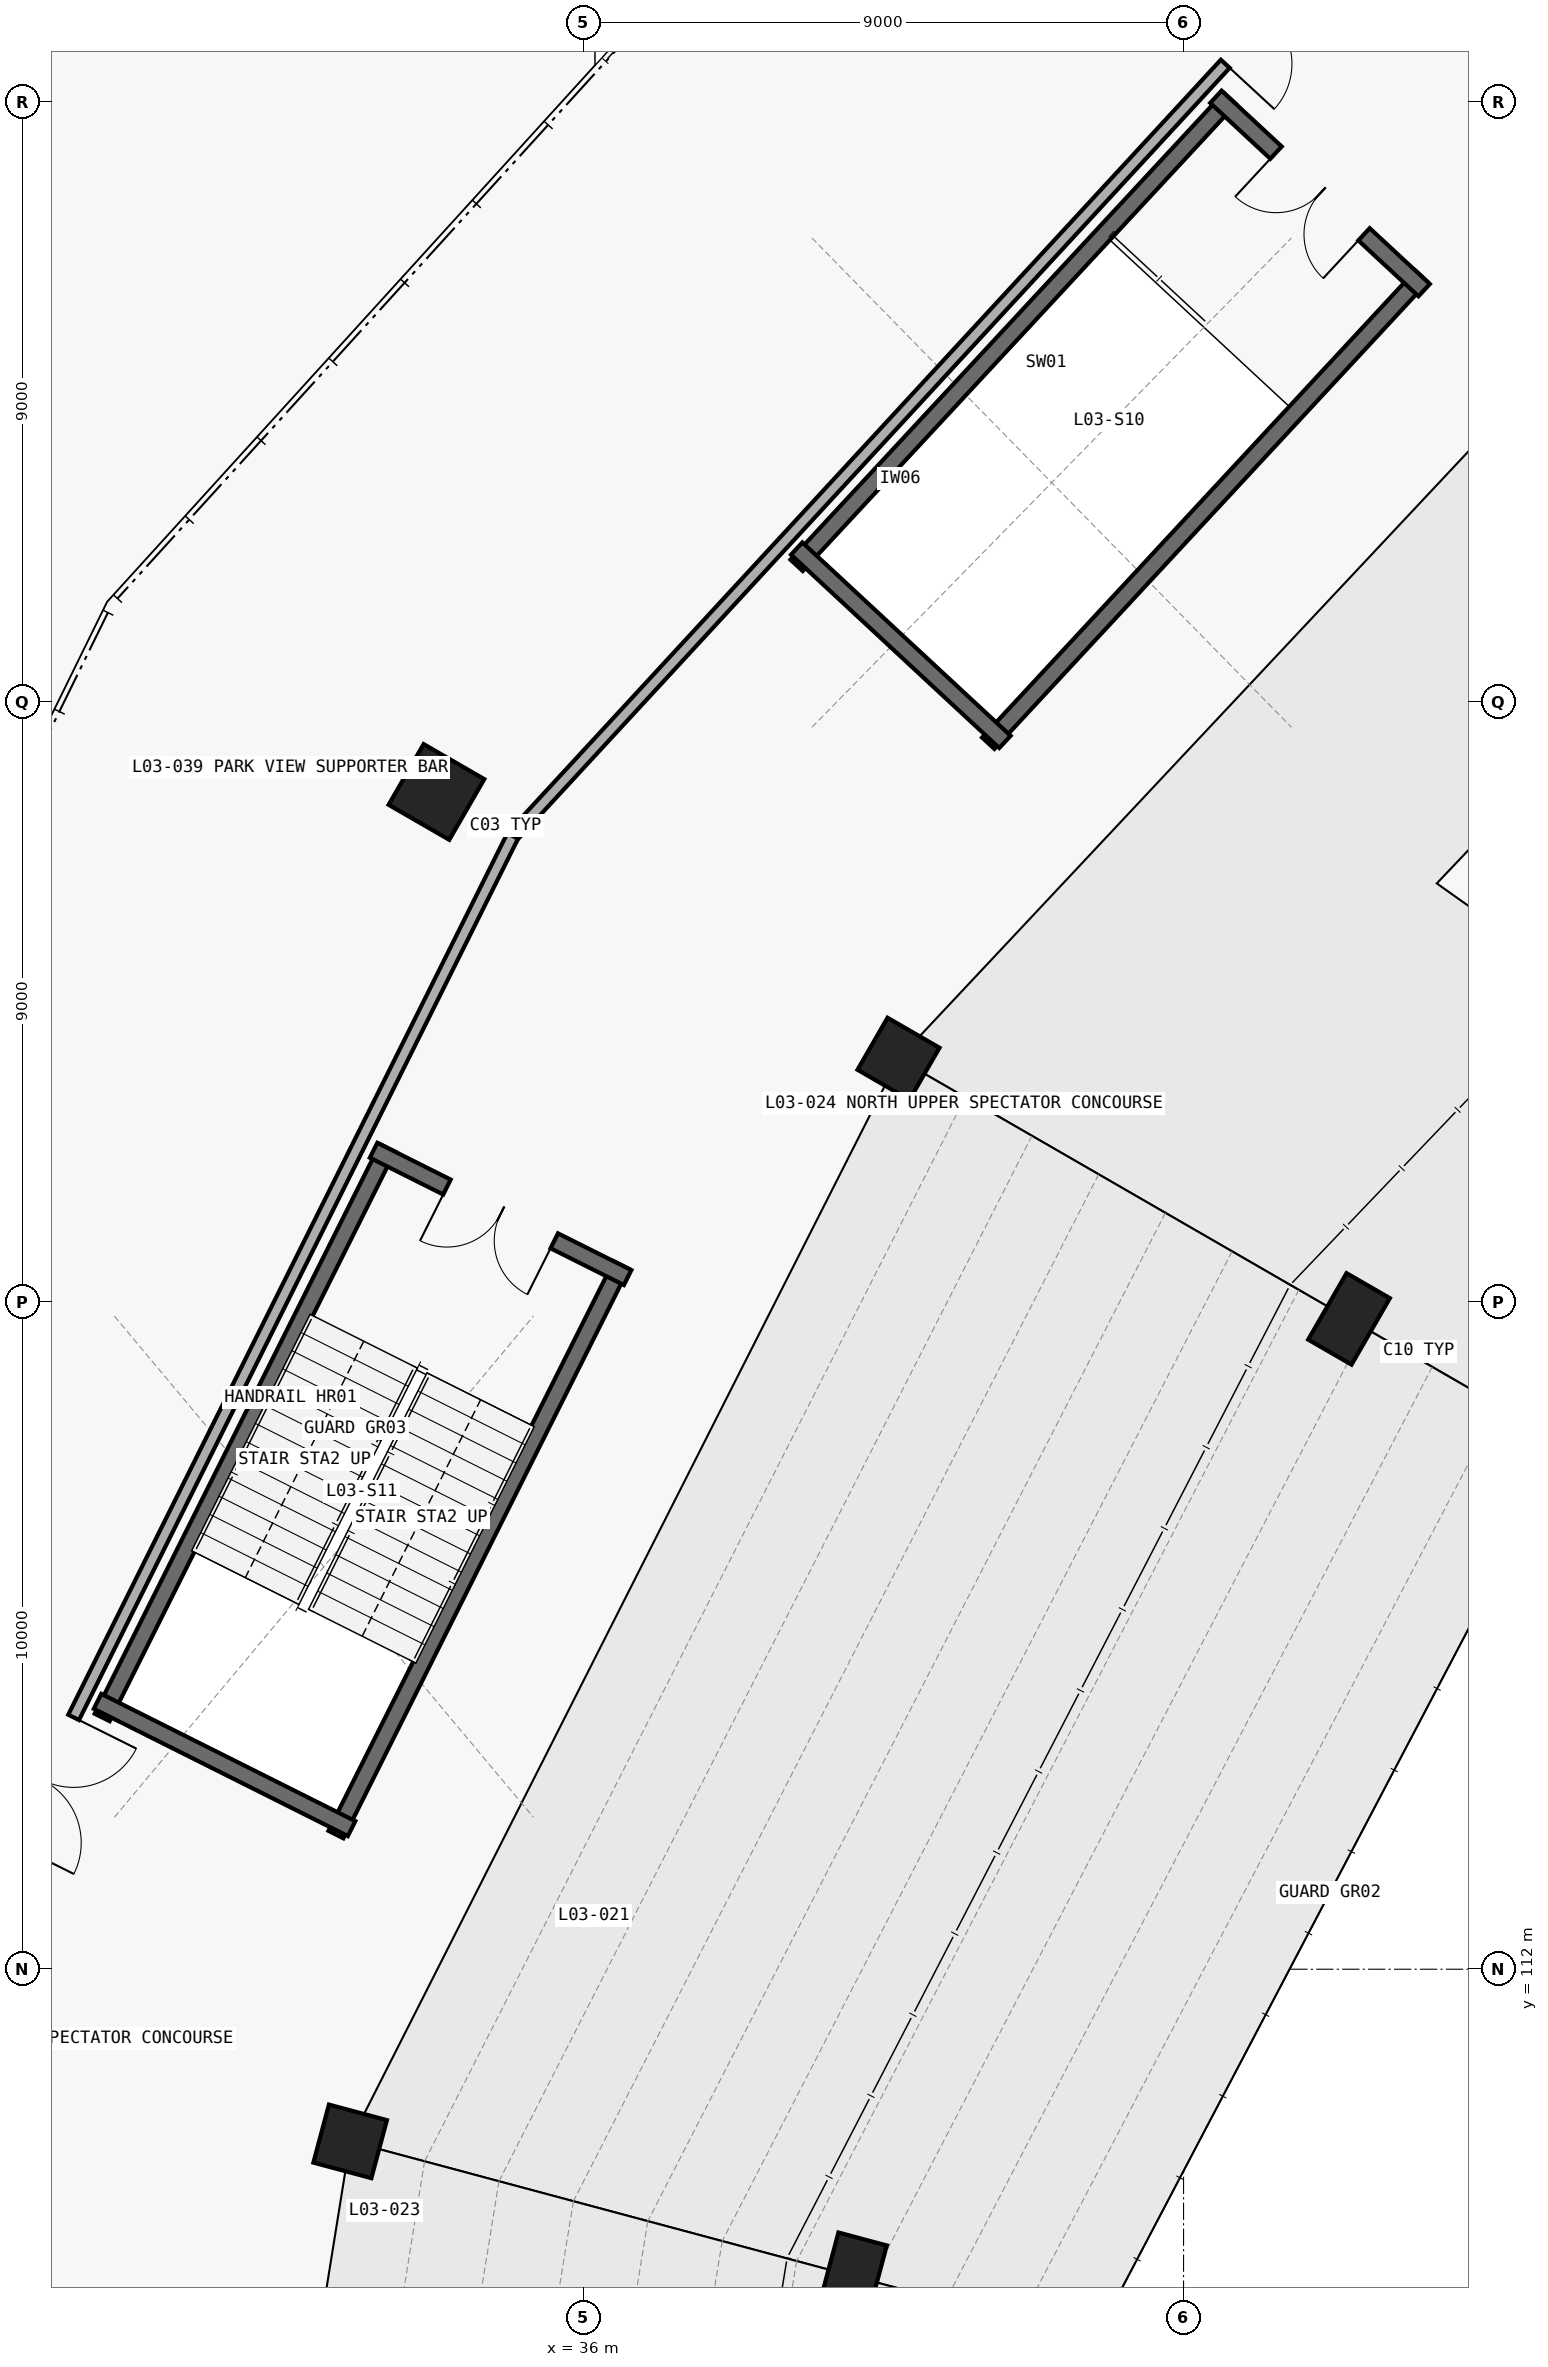
"""IFC4 building model, lengths in metres.
Left out: names, types, materials, properties, quantities, classifications, styles, units other than length and angle.
Written with IfcOpenShell. Run it as: python <this file> out.ifc"""

import sys

from ifc_helpers import new_model, si_unit, direction, frame, frame_2d, origin, origin_2d, place, context, subcontext, project, spatial, rectangle, extrude, element, fill, save


model = new_model("IFC4")
c1 = context("Model", 3, precision=1e-05, world=origin(), true_north=direction((0.0, 1.0)))
c2 = subcontext(c1, "Body", "Model", "MODEL_VIEW")
j1 = project(units=[si_unit("LENGTHUNIT", "METRE"), si_unit("PLANEANGLEUNIT", "RADIAN")], contexts=[c1])
p1 = place(None, origin())
s1 = spatial("IfcSite", under=j1, at=p1, CompositionType="ELEMENT")
p2 = place(p1, origin())
s2 = spatial("IfcBuilding", under=s1, at=p2, CompositionType="ELEMENT")
p3 = place(p2, frame((0.0, 0.0, 15.0)))
s3 = spatial("IfcBuildingStorey", under=s2, at=p3, CompositionType="ELEMENT", Elevation=15.0)
p4 = place(p3, frame((47.481, 121.75, 0.0), z_axis=(0.0, 0.0, 1.0), x_axis=(-0.866025403784, 0.5, 0.0)))
e1 = element("IfcColumn", 1, at=p4, inside=s3, PredefinedType="COLUMN", context=c2, shape_type="SweptSolid", body=[
    extrude(rectangle(XDim=0.75, YDim=1.15, at=origin_2d()), origin(), (0.0, 0.0, 1.0), 4.8),
])
p5 = place(p3, frame((33.798, 129.65, 0.0), z_axis=(0.0, 0.0, 1.0), x_axis=(-0.866025403784, 0.5, 0.0)))
e2 = element("IfcColumn", 2, at=p5, inside=s3, PredefinedType="COLUMN", context=c2, shape_type="SweptSolid", body=[
    extrude(rectangle(XDim=1.05, YDim=1.05, at=origin_2d()), origin(), (0.0, 0.0, 1.0), 4.8),
])
p6 = place(p3, frame((40.726, 125.65, 0.0), z_axis=(0.0, 0.0, 1.0), x_axis=(-0.866025403784, 0.5, 0.0)))
e3 = element("IfcColumn", 3, at=p6, inside=s3, PredefinedType="COLUMN", context=c2, shape_type="SweptSolid", body=[
    extrude(rectangle(XDim=0.9, YDim=0.9, at=origin_2d()), origin(), (0.0, 0.0, 1.0), 4.8),
])
p7 = place(p3, frame((40.039, 107.4, 0.0), z_axis=(0.0, 0.0, 1.0), x_axis=(-0.965925826289, 0.258819045103, 0.0)))
e4 = element("IfcColumn", 4, at=p7, inside=s3, PredefinedType="COLUMN", context=c2, shape_type="SweptSolid", body=[
    extrude(rectangle(XDim=0.75, YDim=1.15, at=origin_2d()), origin(), (0.0, 0.0, 1.0), 4.8),
])
p8 = place(p3, frame((32.504, 109.419, 0.0), z_axis=(0.0, 0.0, 1.0), x_axis=(-0.965925826289, 0.258819045103, 0.0)))
e5 = element("IfcColumn", 5, at=p8, inside=s3, PredefinedType="COLUMN", context=c2, shape_type="SweptSolid", body=[
    extrude(rectangle(XDim=0.9, YDim=0.9, at=origin_2d()), origin(), (0.0, 0.0, 1.0), 4.8),
])
p9 = place(p3, frame((45.694, 140.048, 0.0), z_axis=(0.0, 0.0, 1.0), x_axis=(-0.680257902718, -0.7329728411, 0.0)))
e6 = element("IfcWall", 6, at=p9, inside=s3, PredefinedType="SHEAR", context=c2, shape_type="SweptSolid", body=[
    extrude(rectangle(XDim=9.55, YDim=0.25, at=frame_2d((4.775, 0.0))), origin(), (0.0, 0.0, 1.0), 4.54),
])
p10 = place(p3, frame((42.071, 130.381, 0.0), z_axis=(0.0, 0.0, 1.0), x_axis=(0.680245155897, 0.732984670971, 0.0)))
e7 = element("IfcWall", 7, at=p10, inside=s3, PredefinedType="SHEAR", context=c2, shape_type="SweptSolid", body=[
    extrude(rectangle(XDim=9.55, YDim=0.25, at=frame_2d((4.775, 0.0))), origin(), (0.0, 0.0, 1.0), 4.54),
])
p11 = place(p3, frame((48.607, 137.174, 0.0), z_axis=(0.0, 0.0, 1.0), x_axis=(-0.73295064559, 0.680281817433, 0.0)))
e8 = element("IfcWall", 8, at=p11, inside=s3, PredefinedType="SHEAR", context=c2, shape_type="SweptSolid", body=[
    extrude(rectangle(XDim=4.26, YDim=0.25, at=frame_2d((2.13, 0.0))), origin(), (0.0, 0.0, 1.0), 4.54),
])
p12 = place(p11, frame((1.23, 0.0, 0.0)))
e9 = element("IfcOpeningElement", 9, at=p12, cuts=e8, PredefinedType="OPENING", context=c2, shape_type="SweptSolid", body=[
    extrude(rectangle(XDim=1.8, YDim=2.25, at=frame_2d((0.9, 1.125))), frame((0.0, 0.135, 0.0), z_axis=(0.0, -1.0, 0.0), x_axis=(1.0, 0.0, 0.0)), (0.0, 0.0, 1.0), 0.27),
])
p13 = place(p3, frame((39.199, 133.299, 0.0), z_axis=(0.0, 0.0, 1.0), x_axis=(0.732977166505, -0.680253242096, 0.0)))
e10 = element("IfcWall", 10, at=p13, inside=s3, PredefinedType="SHEAR", context=c2, shape_type="SweptSolid", body=[
    extrude(rectangle(XDim=4.26, YDim=0.25, at=frame_2d((2.13, 0.0))), origin(), (0.0, 0.0, 1.0), 4.54),
])
p14 = place(p3, frame((33.063, 124.313, 0.0), z_axis=(0.0, 0.0, 1.0), x_axis=(-0.447919041961, -0.894074119885, 0.0)))
e11 = element("IfcWall", 11, at=p14, inside=s3, PredefinedType="SHEAR", context=c2, shape_type="SweptSolid", body=[
    extrude(rectangle(XDim=9.55, YDim=0.25, at=frame_2d((4.775, 0.0))), origin(), (0.0, 0.0, 1.0), 4.54),
])
p15 = place(p3, frame((32.291, 114.019, 0.0), z_axis=(0.0, 0.0, 1.0), x_axis=(0.4479088042, 0.894079248792, 0.0)))
e12 = element("IfcWall", 12, at=p15, inside=s3, PredefinedType="SHEAR", context=c2, shape_type="SweptSolid", body=[
    extrude(rectangle(XDim=9.55, YDim=0.25, at=frame_2d((4.775, 0.0))), origin(), (0.0, 0.0, 1.0), 4.54),
])
p16 = place(p3, frame((36.664, 122.37, 0.0), z_axis=(0.0, 0.0, 1.0), x_axis=(-0.894071595331, 0.447924081092, 0.0)))
e13 = element("IfcWall", 13, at=p16, inside=s3, PredefinedType="SHEAR", context=c2, shape_type="SweptSolid", body=[
    extrude(rectangle(XDim=4.26, YDim=0.25, at=frame_2d((2.13, 0.0))), origin(), (0.0, 0.0, 1.0), 4.54),
])
p17 = place(p16, frame((1.23, 0.0, 0.0)))
e14 = element("IfcOpeningElement", 14, at=p17, cuts=e13, PredefinedType="OPENING", context=c2, shape_type="SweptSolid", body=[
    extrude(rectangle(XDim=1.8, YDim=2.25, at=frame_2d((0.9, 1.125))), frame((0.0, 0.135, 0.0), z_axis=(0.0, -1.0, 0.0), x_axis=(1.0, 0.0, 0.0)), (0.0, 0.0, 1.0), 0.27),
])
p18 = place(p3, frame((28.717, 116.016, 0.0), z_axis=(0.0, 0.0, 1.0), x_axis=(0.894083048484, -0.447901219481, 0.0)))
e15 = element("IfcWall", 15, at=p18, inside=s3, PredefinedType="SHEAR", context=c2, shape_type="SweptSolid", body=[
    extrude(rectangle(XDim=4.26, YDim=0.25, at=frame_2d((2.13, 0.0))), origin(), (0.0, 0.0, 1.0), 4.54),
])
p19 = place(p3, frame((49.082, 144.312, 0.0), z_axis=(0.0, 0.0, 1.0), x_axis=(-0.678220768878, -0.734858209903, 0.0)))
e16 = element("IfcWall", 16, at=p19, inside=s3, PredefinedType="PARTITIONING", context=c2, shape_type="SweptSolid", body=[
    extrude(rectangle(XDim=20.85, YDim=0.18, at=frame_2d((10.425, 0.0))), origin(), (0.0, 0.0, 1.0), 3.665),
])
p20 = place(p19, frame((3.097, 0.0, 0.0)))
e17 = element("IfcOpeningElement", 17, at=p20, cuts=e16, PredefinedType="OPENING", context=c2, shape_type="SweptSolid", body=[
    extrude(rectangle(XDim=2.0, YDim=2.3, at=frame_2d((1.0, 1.15))), frame((0.0, 0.1, 0.0), z_axis=(0.0, -1.0, 0.0), x_axis=(1.0, 0.0, 0.0)), (0.0, 0.0, 1.0), 0.2),
])
p21 = place(p3, frame((34.941, 128.99, 0.0), z_axis=(0.0, 0.0, 1.0), x_axis=(-0.44590512567, -0.895080230427, 0.0)))
e18 = element("IfcWall", 18, at=p21, inside=s3, PredefinedType="PARTITIONING", context=c2, shape_type="SweptSolid", body=[
    extrude(rectangle(XDim=19.935, YDim=0.18, at=frame_2d((9.967, 0.0))), origin(), (0.0, 0.0, 1.0), 3.665),
])
p22 = place(p21, frame((14.763, 0.0, 0.0)))
e19 = element("IfcOpeningElement", 19, at=p22, cuts=e18, PredefinedType="OPENING", context=c2, shape_type="SweptSolid", body=[
    extrude(rectangle(XDim=2.1, YDim=2.35, at=frame_2d((1.05, 1.175))), frame((0.0, 0.1, 0.0), z_axis=(0.0, -1.0, 0.0), x_axis=(1.0, 0.0, 0.0)), (0.0, 0.0, 1.0), 0.2),
])
p23 = place(p12, origin())
e20 = element("IfcDoor", 20, at=p23, inside=s3, OperationType="DOUBLE_DOOR_SINGLE_SWING", PredefinedType="DOOR", context=c2, shape_type="SweptSolid", body=[
    extrude(rectangle(XDim=1.8, YDim=2.25, at=frame_2d((0.9, 1.125))), frame((0.0, 0.025, 0.0), z_axis=(0.0, -1.0, 0.0), x_axis=(1.0, 0.0, 0.0)), (0.0, 0.0, 1.0), 0.05),
])
fill(e9, e20)
p24 = place(p17, origin())
e21 = element("IfcDoor", 21, at=p24, inside=s3, OperationType="DOUBLE_DOOR_SINGLE_SWING", PredefinedType="DOOR", context=c2, shape_type="SweptSolid", body=[
    extrude(rectangle(XDim=1.8, YDim=2.25, at=frame_2d((0.9, 1.125))), frame((0.0, 0.025, 0.0), z_axis=(0.0, -1.0, 0.0), x_axis=(1.0, 0.0, 0.0)), (0.0, 0.0, 1.0), 0.05),
])
fill(e14, e21)
p25 = place(p20, origin())
e22 = element("IfcDoor", 22, at=p25, inside=s3, OperationType="DOUBLE_DOOR_SINGLE_SWING", PredefinedType="DOOR", context=c2, shape_type="SweptSolid", body=[
    extrude(rectangle(XDim=2.0, YDim=2.3, at=frame_2d((1.0, 1.15))), frame((0.0, 0.025, 0.0), z_axis=(0.0, -1.0, 0.0), x_axis=(1.0, 0.0, 0.0)), (0.0, 0.0, 1.0), 0.05),
])
fill(e17, e22)
p26 = place(p22, origin())
e23 = element("IfcDoor", 23, at=p26, inside=s3, OperationType="DOUBLE_DOOR_SINGLE_SWING", PredefinedType="DOOR", context=c2, shape_type="SweptSolid", body=[
    extrude(rectangle(XDim=2.1, YDim=2.35, at=frame_2d((1.05, 1.175))), frame((0.0, 0.025, 0.0), z_axis=(0.0, -1.0, 0.0), x_axis=(1.0, 0.0, 0.0)), (0.0, 0.0, 1.0), 0.05),
])
fill(e19, e23)
save(model, sys.argv[1])
